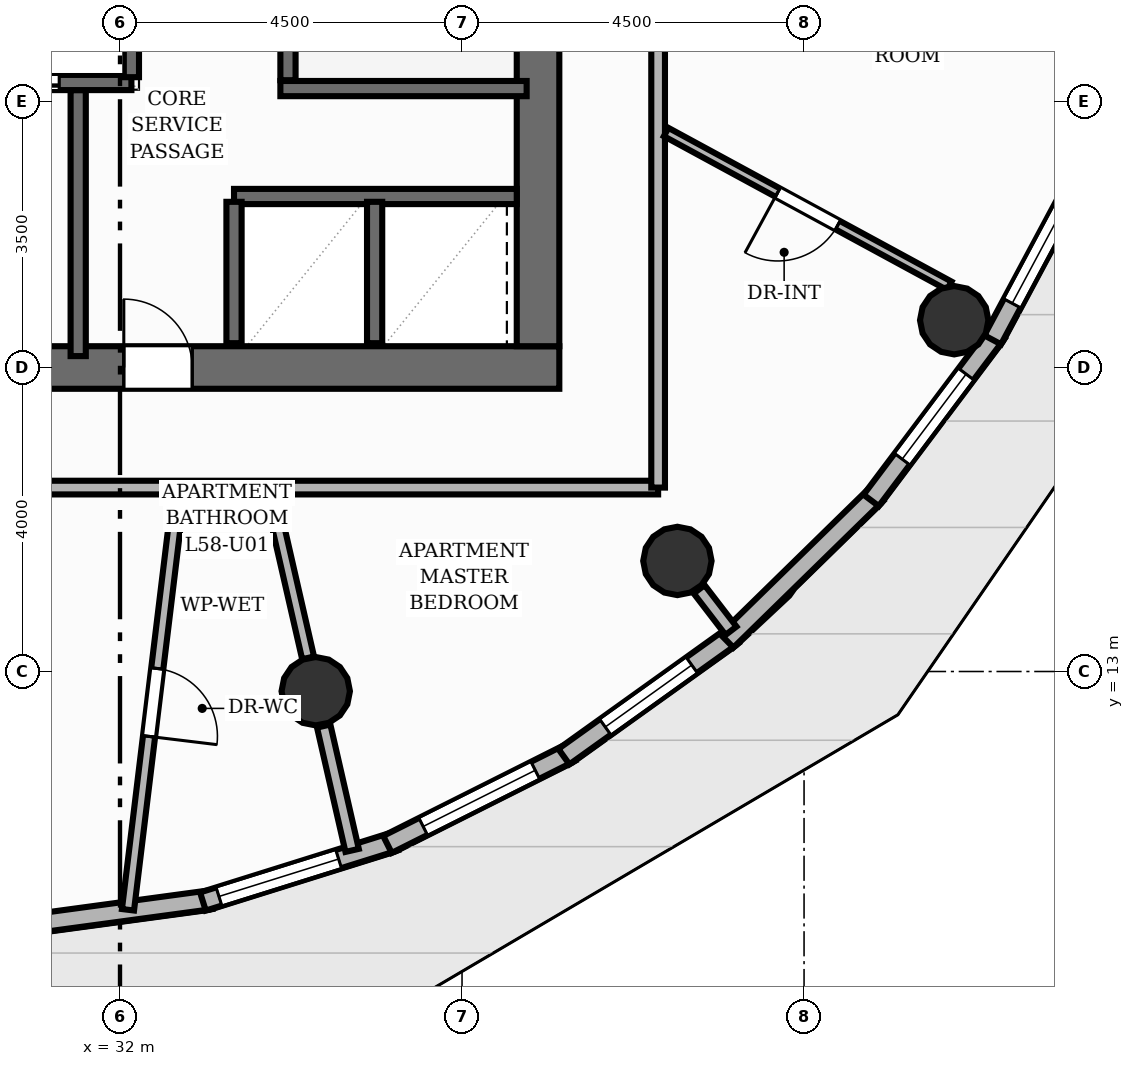
"""IFC4 building model, lengths in metres.
Left out: names, types, materials, properties, quantities, classifications, styles, units other than length and angle.
Written with IfcOpenShell. Run it as: python <this file> out.ifc"""

import sys

from ifc_helpers import new_model, si_unit, direction, frame, frame_2d, origin, origin_2d, place, context, subcontext, project, spatial, rectangle, circle, extrude, element, fill, save


model = new_model("IFC4")
c1 = context("Model", 3, precision=1e-05, world=origin(), true_north=direction((0.0, 1.0)))
c2 = subcontext(c1, "Body", "Model", "MODEL_VIEW")
j1 = project(units=[si_unit("LENGTHUNIT", "METRE"), si_unit("PLANEANGLEUNIT", "RADIAN")], contexts=[c1])
p1 = place(None, origin())
s1 = spatial("IfcSite", under=j1, at=p1, CompositionType="ELEMENT")
p2 = place(p1, origin())
s2 = spatial("IfcBuilding", under=s1, at=p2, CompositionType="ELEMENT")
p3 = place(p2, frame((0.0, 0.0, 195.04)))
s3 = spatial("IfcBuildingStorey", under=s2, at=p3, CompositionType="ELEMENT", Elevation=195.04)
p4 = place(p3, frame((26.22, 17.0, 0.0), z_axis=(0.0, 0.0, 1.0), x_axis=(1.0, 0.0, 0.0)))
e1 = element("IfcWall", 1, at=p4, inside=s3, PredefinedType="SHEAR", context=c2, shape_type="SweptSolid", body=[
    extrude(rectangle(XDim=11.56, YDim=0.56, at=frame_2d((5.78, 0.0))), origin(), (0.0, 0.0, 1.0), 3.2),
])
p5 = place(p4, frame((2.28, 0.0, 0.0)))
e2 = element("IfcOpeningElement", 2, at=p5, cuts=e1, PredefinedType="OPENING", context=c2, shape_type="SweptSolid", body=[
    extrude(rectangle(XDim=1.1, YDim=2.15, at=frame_2d((0.55, 1.075))), frame((0.0, 0.29, 0.0), z_axis=(0.0, -1.0, 0.0), x_axis=(1.0, 0.0, 0.0)), (0.0, 0.0, 1.0), 0.58),
])
p6 = place(p4, frame((5.83, 0.0, 0.0)))
e3 = element("IfcOpeningElement", 3, at=p6, cuts=e1, PredefinedType="OPENING", context=c2, shape_type="SweptSolid", body=[
    extrude(rectangle(XDim=0.9, YDim=2.1, at=frame_2d((0.45, 1.05))), frame((0.0, 0.29, 0.0), z_axis=(0.0, -1.0, 0.0), x_axis=(1.0, 0.0, 0.0)), (0.0, 0.0, 1.0), 0.58),
])
p7 = place(p3, frame((37.5, 17.28, 0.0), z_axis=(0.0, 0.0, 1.0), x_axis=(0.0, 1.0, 0.0)))
e4 = element("IfcWall", 4, at=p7, inside=s3, PredefinedType="SHEAR", context=c2, shape_type="SweptSolid", body=[
    extrude(rectangle(XDim=13.44, YDim=0.56, at=frame_2d((6.72, 0.0))), origin(), (0.0, 0.0, 1.0), 3.2),
])
for number, where, z_axis, x_axis in (
    (5, (34.575, 12.74, 0.0), (0.0, 0.0, 1.0), (1.0, 0.0, 0.0)),
    (6, (39.333, 14.455, 0.0), (0.0, 0.0, 1.0), (1.0, 0.0, 0.0)),
    (7, (42.975, 17.622, 0.0), (0.0, 0.0, 1.0), (1.0, 0.0, 0.0)),
):
    element("IfcColumn", number, at=place(p3, frame(where, z_axis=z_axis, x_axis=x_axis)), inside=s3, PredefinedType="COLUMN", context=c2, shape_type="SweptSolid", body=[
        extrude(circle(Radius=0.45, at=origin_2d()), origin(), (0.0, 0.0, 1.0), 3.2),
    ])
p8 = place(p3, frame((33.199, 9.998, 0.0), z_axis=(0.0, 0.0, 1.0), x_axis=(-0.990951844978, -0.134217886046, 0.0)))
e8 = element("IfcWall", 8, at=p8, inside=s3, PredefinedType="SOLIDWALL", context=c2, shape_type="SweptSolid", body=[
    extrude(rectangle(XDim=2.592, YDim=0.25, at=frame_2d((1.296, 0.0))), origin(), (0.0, 0.0, 1.0), 2.96),
])
p9 = place(p3, frame((35.621, 10.766, 0.0), z_axis=(0.0, 0.0, 1.0), x_axis=(-0.954307768746, -0.298825505122, 0.0)))
e9 = element("IfcWall", 9, at=p9, inside=s3, PredefinedType="SOLIDWALL", context=c2, shape_type="SweptSolid", body=[
    extrude(rectangle(XDim=2.651, YDim=0.25, at=frame_2d((1.326, 0.0))), origin(), (0.0, 0.0, 1.0), 2.96),
])
p10 = place(p9, frame((0.78, 0.0, 0.85)))
e10 = element("IfcOpeningElement", 10, at=p10, cuts=e9, PredefinedType="OPENING", context=c2, shape_type="SweptSolid", body=[
    extrude(rectangle(XDim=1.65, YDim=1.52, at=frame_2d((0.825, 0.76))), frame((0.0, 0.135, 0.0), z_axis=(0.0, -1.0, 0.0), x_axis=(1.0, 0.0, 0.0)), (0.0, 0.0, 1.0), 0.27),
])
p11 = place(p3, frame((37.934, 11.937, 0.0), z_axis=(0.0, 0.0, 1.0), x_axis=(-0.893757522153, -0.448550433724, 0.0)))
e11 = element("IfcWall", 11, at=p11, inside=s3, PredefinedType="SOLIDWALL", context=c2, shape_type="SweptSolid", body=[
    extrude(rectangle(XDim=2.702, YDim=0.25, at=frame_2d((1.351, 0.0))), origin(), (0.0, 0.0, 1.0), 2.96),
])
p12 = place(p11, frame((0.526, 0.0, 0.85)))
e12 = element("IfcOpeningElement", 12, at=p12, cuts=e11, PredefinedType="OPENING", context=c2, shape_type="SweptSolid", body=[
    extrude(rectangle(XDim=1.65, YDim=1.55, at=frame_2d((0.825, 0.775))), frame((0.0, 0.135, 0.0), z_axis=(0.0, -1.0, 0.0), x_axis=(1.0, 0.0, 0.0)), (0.0, 0.0, 1.0), 0.27),
])
p13 = place(p3, frame((40.066, 13.474, 0.0), z_axis=(0.0, 0.0, 1.0), x_axis=(-0.812997900305, -0.58226661771, 0.0)))
e13 = element("IfcWall", 13, at=p13, inside=s3, PredefinedType="SOLIDWALL", context=c2, shape_type="SweptSolid", body=[
    extrude(rectangle(XDim=2.739, YDim=0.25, at=frame_2d((1.369, 0.0))), origin(), (0.0, 0.0, 1.0), 2.96),
])
p14 = place(p13, frame((0.669, 0.0, 0.85)))
e14 = element("IfcOpeningElement", 14, at=p14, cuts=e13, PredefinedType="OPENING", context=c2, shape_type="SweptSolid", body=[
    extrude(rectangle(XDim=1.4, YDim=1.55, at=frame_2d((0.7, 0.775))), frame((0.0, 0.135, 0.0), z_axis=(0.0, -1.0, 0.0), x_axis=(1.0, 0.0, 0.0)), (0.0, 0.0, 1.0), 0.27),
])
p15 = place(p3, frame((41.955, 15.333, 0.0), z_axis=(0.0, 0.0, 1.0), x_axis=(-0.71485422762, -0.699273503898, 0.0)))
e15 = element("IfcWall", 15, at=p15, inside=s3, PredefinedType="SOLIDWALL", context=c2, shape_type="SweptSolid", body=[
    extrude(rectangle(XDim=2.758, YDim=0.25, at=frame_2d((1.379, 0.0))), origin(), (0.0, 0.0, 1.0), 2.96),
])
p16 = place(p3, frame((43.54, 17.456, 0.0), z_axis=(0.0, 0.0, 1.0), x_axis=(-0.600877762795, -0.799340924874, 0.0)))
e16 = element("IfcWall", 16, at=p16, inside=s3, PredefinedType="SOLIDWALL", context=c2, shape_type="SweptSolid", body=[
    extrude(rectangle(XDim=2.758, YDim=0.25, at=frame_2d((1.379, 0.0))), origin(), (0.0, 0.0, 1.0), 2.96),
])
p17 = place(p16, frame((0.679, 0.0, 0.85)))
e17 = element("IfcOpeningElement", 17, at=p17, cuts=e16, PredefinedType="OPENING", context=c2, shape_type="SweptSolid", body=[
    extrude(rectangle(XDim=1.4, YDim=1.55, at=frame_2d((0.7, 0.775))), frame((0.0, 0.135, 0.0), z_axis=(0.0, -1.0, 0.0), x_axis=(1.0, 0.0, 0.0)), (0.0, 0.0, 1.0), 0.27),
])
p18 = place(p3, frame((44.774, 19.779, 0.0), z_axis=(0.0, 0.0, 1.0), x_axis=(-0.472035862223, -0.88157934684, 0.0)))
e18 = element("IfcWall", 18, at=p18, inside=s3, PredefinedType="SOLIDWALL", context=c2, shape_type="SweptSolid", body=[
    extrude(rectangle(XDim=2.739, YDim=0.25, at=frame_2d((1.369, 0.0))), origin(), (0.0, 0.0, 1.0), 2.96),
])
p19 = place(p18, frame((0.544, 0.0, 0.85)))
e19 = element("IfcOpeningElement", 19, at=p19, cuts=e18, PredefinedType="OPENING", context=c2, shape_type="SweptSolid", body=[
    extrude(rectangle(XDim=1.65, YDim=1.55, at=frame_2d((0.825, 0.775))), frame((0.0, 0.135, 0.0), z_axis=(0.0, -1.0, 0.0), x_axis=(1.0, 0.0, 0.0)), (0.0, 0.0, 1.0), 0.27),
])
p20 = place(p3, frame((34.21, 20.78, 0.0), z_axis=(0.0, 0.0, 1.0), x_axis=(0.0, 1.0, 0.0)))
e20 = element("IfcWall", 20, at=p20, inside=s3, PredefinedType="SHEAR", context=c2, shape_type="SweptSolid", body=[
    extrude(rectangle(XDim=6.44, YDim=0.2, at=frame_2d((3.22, 0.0))), origin(), (0.0, 0.0, 1.0), 3.2),
])
p21 = place(p3, frame((34.11, 20.67, 0.0), z_axis=(0.0, 0.0, 1.0), x_axis=(1.0, 0.0, 0.0)))
e21 = element("IfcWall", 21, at=p21, inside=s3, PredefinedType="SHEAR", context=c2, shape_type="SweptSolid", body=[
    extrude(rectangle(XDim=3.24, YDim=0.2, at=frame_2d((1.62, 0.0))), origin(), (0.0, 0.0, 1.0), 3.2),
])
p22 = place(p3, frame((31.45, 17.15, 0.0), z_axis=(0.0, 0.0, 1.0), x_axis=(0.0, 1.0, 0.0)))
e22 = element("IfcWall", 22, at=p22, inside=s3, PredefinedType="SHEAR", context=c2, shape_type="SweptSolid", body=[
    extrude(rectangle(XDim=3.5, YDim=0.2, at=frame_2d((1.75, 0.0))), origin(), (0.0, 0.0, 1.0), 3.2),
])
p23 = place(p3, frame((29.85, 20.75, 0.0), z_axis=(0.0, 0.0, 1.0), x_axis=(1.0, 0.0, 0.0)))
e23 = element("IfcWall", 23, at=p23, inside=s3, PredefinedType="SHEAR", context=c2, shape_type="SweptSolid", body=[
    extrude(rectangle(XDim=2.3, YDim=0.2, at=frame_2d((1.15, 0.0))), origin(), (0.0, 0.0, 1.0), 3.2),
])
p24 = place(p23, frame((0.25, 0.0, 0.0)))
e24 = element("IfcOpeningElement", 24, at=p24, cuts=e23, PredefinedType="OPENING", context=c2, shape_type="SweptSolid", body=[
    extrude(rectangle(XDim=1.1, YDim=2.15, at=frame_2d((0.55, 1.075))), frame((0.0, 0.11, 0.0), z_axis=(0.0, -1.0, 0.0), x_axis=(1.0, 0.0, 0.0)), (0.0, 0.0, 1.0), 0.22),
])
p25 = place(p3, frame((32.15, 20.82, 0.0), z_axis=(0.0, 0.0, 1.0), x_axis=(0.0, 1.0, 0.0)))
e25 = element("IfcWall", 25, at=p25, inside=s3, PredefinedType="SHEAR", context=c2, shape_type="SweptSolid", body=[
    extrude(rectangle(XDim=1.71, YDim=0.2, at=frame_2d((0.855, 0.0))), origin(), (0.0, 0.0, 1.0), 3.2),
])
p26 = place(p3, frame((33.5, 19.25, 0.0), z_axis=(0.0, 0.0, 1.0), x_axis=(1.0, 0.0, 0.0)))
e26 = element("IfcWall", 26, at=p26, inside=s3, PredefinedType="SHEAR", context=c2, shape_type="SweptSolid", body=[
    extrude(rectangle(XDim=3.72, YDim=0.2, at=frame_2d((1.86, 0.0))), origin(), (0.0, 0.0, 1.0), 3.2),
])
for number, where, z_axis, x_axis in (
    (27, (33.5, 17.32, 0.0), (0.0, 0.0, 1.0), (0.0, 1.0, 0.0)),
    (28, (35.35, 17.32, 0.0), (0.0, 0.0, 1.0), (0.0, 1.0, 0.0)),
):
    element("IfcWall", number, at=place(p3, frame(where, z_axis=z_axis, x_axis=x_axis)), inside=s3, PredefinedType="SHEAR", context=c2, shape_type="SweptSolid", body=[
        extrude(rectangle(XDim=1.86, YDim=0.2, at=frame_2d((0.93, 0.0))), origin(), (0.0, 0.0, 1.0), 3.2),
    ])
p27 = place(p3, frame((34.68, 12.282, 0.0), z_axis=(0.0, 0.0, 1.0), x_axis=(0.222978827263, -0.97482328788, 0.0)))
e29 = element("IfcWall", 29, at=p27, inside=s3, PredefinedType="PARTITIONING", context=c2, shape_type="SweptSolid", body=[
    extrude(rectangle(XDim=1.678, YDim=0.18, at=frame_2d((0.839, 0.0))), origin(), (0.0, 0.0, 1.0), 2.403),
])
p28 = place(p3, frame((39.62, 14.082, 0.0), z_axis=(0.0, 0.0, 1.0), x_axis=(0.60904199592, -0.793137974885, 0.0)))
e30 = element("IfcWall", 30, at=p28, inside=s3, PredefinedType="PARTITIONING", context=c2, shape_type="SweptSolid", body=[
    extrude(rectangle(XDim=0.688, YDim=0.18, at=frame_2d((0.344, 0.0))), origin(), (0.0, 0.0, 1.0), 2.403),
])
p29 = place(p3, frame((39.08, 15.42, 0.0), z_axis=(0.0, 0.0, 1.0), x_axis=(-1.0, 0.0, 0.0)))
e31 = element("IfcWall", 31, at=p29, inside=s3, PredefinedType="PARTITIONING", context=c2, shape_type="SweptSolid", body=[
    extrude(rectangle(XDim=14.16, YDim=0.18, at=frame_2d((7.08, 0.0))), origin(), (0.0, 0.0, 1.0), 2.955),
])
p30 = place(p29, frame((8.155, 0.0, 0.0)))
e32 = element("IfcOpeningElement", 32, at=p30, cuts=e31, PredefinedType="OPENING", context=c2, shape_type="SweptSolid", body=[
    extrude(rectangle(XDim=1.05, YDim=2.15, at=frame_2d((0.525, 1.075))), frame((0.0, 0.1, 0.0), z_axis=(0.0, -1.0, 0.0), x_axis=(1.0, 0.0, 0.0)), (0.0, 0.0, 1.0), 0.2),
])
p31 = place(p3, frame((39.08, 30.508, 0.0), z_axis=(0.0, 0.0, 1.0), x_axis=(0.0, -1.0, 0.0)))
e33 = element("IfcWall", 33, at=p31, inside=s3, PredefinedType="PARTITIONING", context=c2, shape_type="SweptSolid", body=[
    extrude(rectangle(XDim=15.088, YDim=0.18, at=frame_2d((7.544, 0.0))), origin(), (0.0, 0.0, 1.0), 2.955),
])
p32 = place(p31, frame((7.548, 0.0, 0.0)))
e34 = element("IfcOpeningElement", 34, at=p32, cuts=e33, PredefinedType="OPENING", context=c2, shape_type="SweptSolid", body=[
    extrude(rectangle(XDim=1.05, YDim=2.15, at=frame_2d((0.525, 1.075))), frame((0.0, 0.1, 0.0), z_axis=(0.0, -1.0, 0.0), x_axis=(1.0, 0.0, 0.0)), (0.0, 0.0, 1.0), 0.2),
])
p33 = place(p3, frame((32.768, 15.321, 0.0), z_axis=(0.0, 0.0, 1.0), x_axis=(-0.120556883214, -0.992706420806, 0.0)))
e35 = element("IfcWall", 35, at=p33, inside=s3, PredefinedType="PLUMBINGWALL", context=c2, shape_type="SweptSolid", body=[
    extrude(rectangle(XDim=5.496, YDim=0.16, at=frame_2d((2.748, 0.0))), origin(), (0.0, 0.0, 1.0), 2.692),
])
p34 = place(p33, frame((2.298, 0.0, 0.0)))
e36 = element("IfcOpeningElement", 36, at=p34, cuts=e35, PredefinedType="OPENING", context=c2, shape_type="SweptSolid", body=[
    extrude(rectangle(XDim=0.9, YDim=2.1, at=frame_2d((0.45, 1.05))), frame((0.0, 0.09, 0.0), z_axis=(0.0, -1.0, 0.0), x_axis=(1.0, 0.0, 0.0)), (0.0, 0.0, 1.0), 0.18),
])
p35 = place(p3, frame((33.985, 15.323, 0.0), z_axis=(0.0, 0.0, 1.0), x_axis=(0.222969522248, -0.974825416241, 0.0)))
e37 = element("IfcWall", 37, at=p35, inside=s3, PredefinedType="PLUMBINGWALL", context=c2, shape_type="SweptSolid", body=[
    extrude(rectangle(XDim=2.199, YDim=0.16, at=frame_2d((1.099, 0.0))), origin(), (0.0, 0.0, 1.0), 2.403),
])
p36 = place(p3, frame((42.911, 18.075, 0.0), z_axis=(0.0, 0.0, 1.0), x_axis=(-0.878816171277, 0.477160494071, 0.0)))
e38 = element("IfcWall", 38, at=p36, inside=s3, PredefinedType="PARTITIONING", context=c2, shape_type="SweptSolid", body=[
    extrude(rectangle(XDim=4.239, YDim=0.125, at=frame_2d((2.12, 0.0))), origin(), (0.0, 0.0, 1.0), 2.403),
])
p37 = place(p36, frame((1.67, 0.0, 0.0)))
e39 = element("IfcOpeningElement", 39, at=p37, cuts=e38, PredefinedType="OPENING", context=c2, shape_type="SweptSolid", body=[
    extrude(rectangle(XDim=0.9, YDim=2.1, at=frame_2d((0.45, 1.05))), frame((0.0, 0.073, 0.0), z_axis=(0.0, -1.0, 0.0), x_axis=(1.0, 0.0, 0.0)), (0.0, 0.0, 1.0), 0.145),
])
p38 = place(p10, origin())
e40 = element("IfcWindow", 40, at=p38, inside=s3, PartitioningType="SINGLE_PANEL", PredefinedType="WINDOW", context=c2, shape_type="SweptSolid", body=[
    extrude(rectangle(XDim=1.65, YDim=1.52, at=frame_2d((0.825, 0.76))), frame((0.0, 0.03, 0.0), z_axis=(0.0, -1.0, 0.0), x_axis=(1.0, 0.0, 0.0)), (0.0, 0.0, 1.0), 0.06),
])
fill(e10, e40)
p39 = place(p12, origin())
e41 = element("IfcWindow", 41, at=p39, inside=s3, PartitioningType="SINGLE_PANEL", PredefinedType="WINDOW", context=c2, shape_type="SweptSolid", body=[
    extrude(rectangle(XDim=1.65, YDim=1.55, at=frame_2d((0.825, 0.775))), frame((0.0, 0.03, 0.0), z_axis=(0.0, -1.0, 0.0), x_axis=(1.0, 0.0, 0.0)), (0.0, 0.0, 1.0), 0.06),
])
fill(e12, e41)
p40 = place(p14, origin())
e42 = element("IfcWindow", 42, at=p40, inside=s3, PartitioningType="SINGLE_PANEL", PredefinedType="WINDOW", context=c2, shape_type="SweptSolid", body=[
    extrude(rectangle(XDim=1.4, YDim=1.55, at=frame_2d((0.7, 0.775))), frame((0.0, 0.03, 0.0), z_axis=(0.0, -1.0, 0.0), x_axis=(1.0, 0.0, 0.0)), (0.0, 0.0, 1.0), 0.06),
])
fill(e14, e42)
p41 = place(p17, origin())
e43 = element("IfcWindow", 43, at=p41, inside=s3, PartitioningType="SINGLE_PANEL", PredefinedType="WINDOW", context=c2, shape_type="SweptSolid", body=[
    extrude(rectangle(XDim=1.4, YDim=1.55, at=frame_2d((0.7, 0.775))), frame((0.0, 0.03, 0.0), z_axis=(0.0, -1.0, 0.0), x_axis=(1.0, 0.0, 0.0)), (0.0, 0.0, 1.0), 0.06),
])
fill(e17, e43)
p42 = place(p19, origin())
e44 = element("IfcWindow", 44, at=p42, inside=s3, PartitioningType="SINGLE_PANEL", PredefinedType="WINDOW", context=c2, shape_type="SweptSolid", body=[
    extrude(rectangle(XDim=1.65, YDim=1.55, at=frame_2d((0.825, 0.775))), frame((0.0, 0.03, 0.0), z_axis=(0.0, -1.0, 0.0), x_axis=(1.0, 0.0, 0.0)), (0.0, 0.0, 1.0), 0.06),
])
fill(e19, e44)
p43 = place(p24, origin())
e45 = element("IfcDoor", 45, at=p43, inside=s3, OperationType="DOUBLE_DOOR_SLIDING", PredefinedType="DOOR", context=c2, shape_type="SweptSolid", body=[
    extrude(rectangle(XDim=1.1, YDim=2.15, at=frame_2d((0.55, 1.075))), frame((0.0, 0.025, 0.0), z_axis=(0.0, -1.0, 0.0), x_axis=(1.0, 0.0, 0.0)), (0.0, 0.0, 1.0), 0.05),
])
fill(e24, e45)
p44 = place(p6, origin())
e46 = element("IfcDoor", 46, at=p44, inside=s3, OperationType="SINGLE_SWING_LEFT", PredefinedType="DOOR", context=c2, shape_type="SweptSolid", body=[
    extrude(rectangle(XDim=0.9, YDim=2.1, at=frame_2d((0.45, 1.05))), frame((0.0, 0.025, 0.0), z_axis=(0.0, -1.0, 0.0), x_axis=(1.0, 0.0, 0.0)), (0.0, 0.0, 1.0), 0.05),
])
fill(e3, e46)
p45 = place(p34, origin())
e47 = element("IfcDoor", 47, at=p45, inside=s3, OperationType="SINGLE_SWING_RIGHT", PredefinedType="DOOR", context=c2, shape_type="SweptSolid", body=[
    extrude(rectangle(XDim=0.9, YDim=2.1, at=frame_2d((0.45, 1.05))), frame((0.0, 0.025, 0.0), z_axis=(0.0, -1.0, 0.0), x_axis=(1.0, 0.0, 0.0)), (0.0, 0.0, 1.0), 0.05),
])
fill(e36, e47)
p46 = place(p37, origin())
e48 = element("IfcDoor", 48, at=p46, inside=s3, OperationType="SINGLE_SWING_RIGHT", PredefinedType="DOOR", context=c2, shape_type="SweptSolid", body=[
    extrude(rectangle(XDim=0.9, YDim=2.1, at=frame_2d((0.45, 1.05))), frame((0.0, 0.025, 0.0), z_axis=(0.0, -1.0, 0.0), x_axis=(1.0, 0.0, 0.0)), (0.0, 0.0, 1.0), 0.05),
])
fill(e39, e48)
save(model, sys.argv[1])
